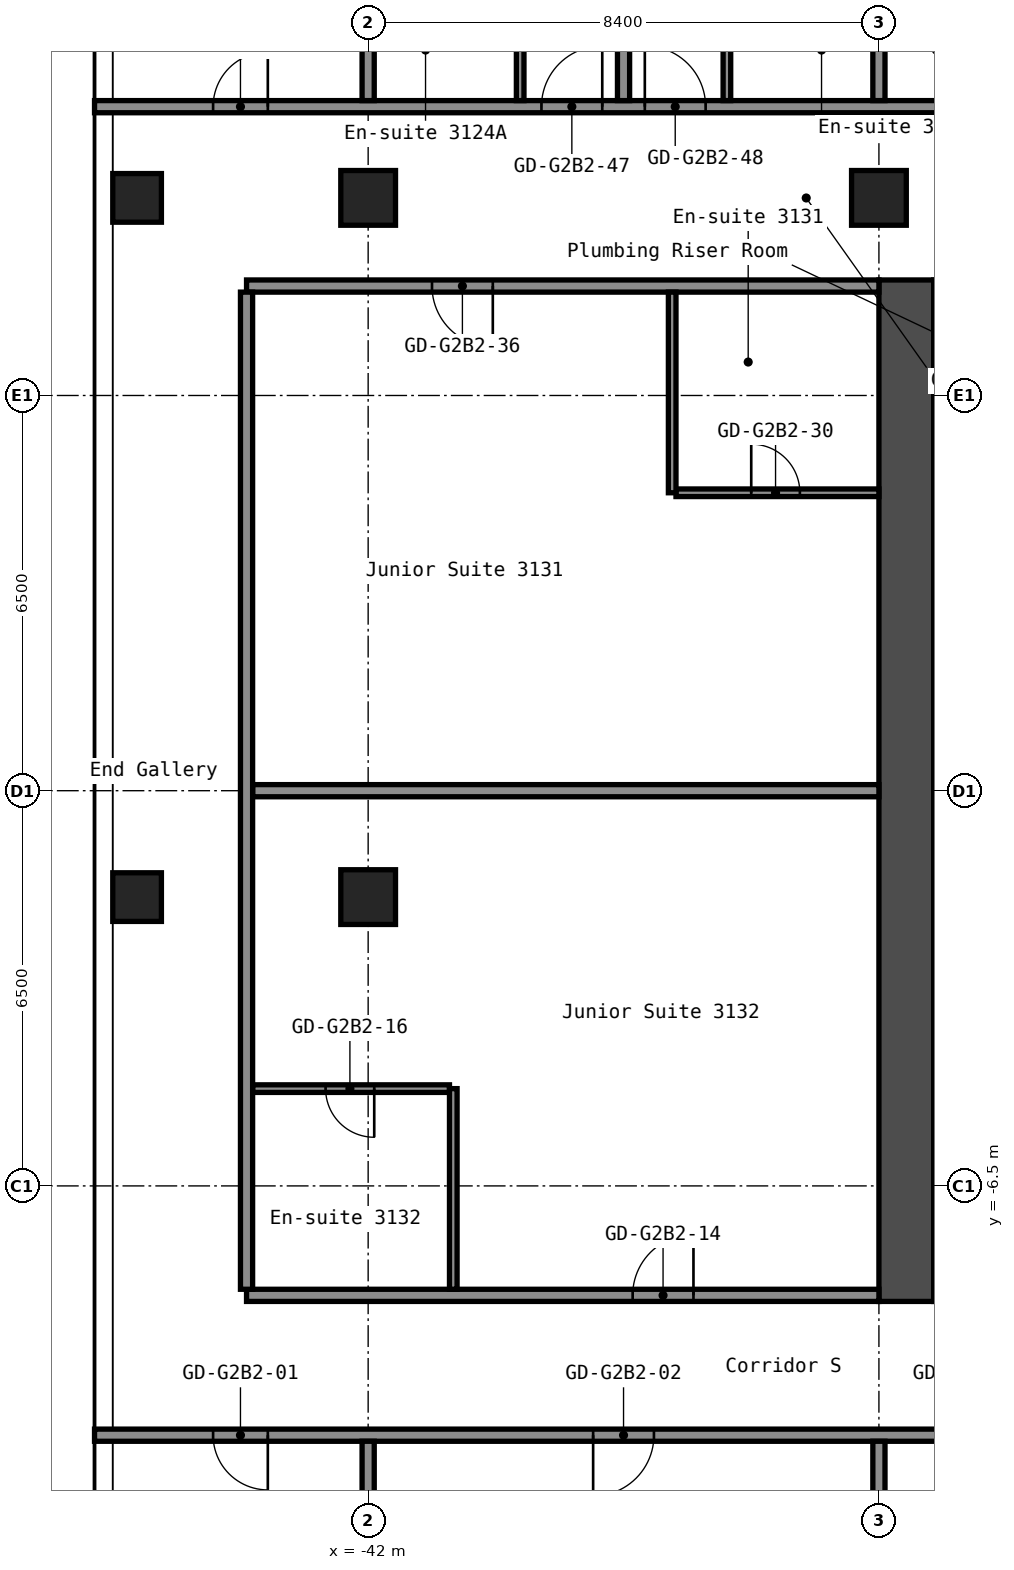
"""IFC4 building model, lengths in metres.
Left out: names, types, materials, properties, quantities, classifications, styles, units other than length and angle.
Written with IfcOpenShell. Run it as: python <this file> out.ifc"""

import sys

from ifc_helpers import new_model, si_unit, direction, frame, frame_2d, origin, origin_2d, place, context, subcontext, project, spatial, rectangle, hollow_rectangle, extrude, element, fill, save


model = new_model("IFC4")
c1 = context("Model", 3, precision=1e-05, world=origin(), true_north=direction((0.0, 1.0)))
c2 = subcontext(c1, "Body", "Model", "MODEL_VIEW")
j1 = project(units=[si_unit("LENGTHUNIT", "METRE"), si_unit("PLANEANGLEUNIT", "RADIAN")], contexts=[c1])
p1 = place(None, origin())
s1 = spatial("IfcSite", under=j1, at=p1, CompositionType="ELEMENT")
p2 = place(p1, origin())
s2 = spatial("IfcBuilding", under=s1, at=p2, CompositionType="ELEMENT")
p3 = place(p2, frame((0.0, 0.0, 110.6)))
s3 = spatial("IfcBuildingStorey", under=s2, at=p3, CompositionType="ELEMENT", Elevation=110.6)
for number, where, z_axis, x_axis in (
    (1, (-45.8, -1.75, 0.0), (0.0, 0.0, 1.0), (1.0, 0.0, 0.0)),
    (2, (-45.8, 9.75, 0.0), (0.0, 0.0, 1.0), (1.0, 0.0, 0.0)),
):
    element("IfcColumn", number, at=place(p3, frame(where, z_axis=z_axis, x_axis=x_axis)), inside=s3, PredefinedType="COLUMN", context=c2, shape_type="SweptSolid", body=[
        extrude(hollow_rectangle(XDim=0.8, YDim=0.8, WallThickness=0.032, at=origin_2d()), origin(), (0.0, 0.0, 1.0), 2.8),
    ])
for number, where, z_axis, x_axis in (
    (3, (-42.0, -1.75, 0.0), (0.0, 0.0, 1.0), (1.0, 0.0, 0.0)),
    (4, (-42.0, 9.75, 0.0), (0.0, 0.0, 1.0), (1.0, 0.0, 0.0)),
    (5, (-33.6, 9.75, 0.0), (0.0, 0.0, 1.0), (1.0, 0.0, 0.0)),
):
    element("IfcColumn", number, at=place(p3, frame(where, z_axis=z_axis, x_axis=x_axis)), inside=s3, PredefinedType="COLUMN", context=c2, shape_type="SweptSolid", body=[
        extrude(hollow_rectangle(XDim=0.9, YDim=0.9, WallThickness=0.036, at=origin_2d()), origin(), (0.0, 0.0, 1.0), 2.8),
    ])
p4 = place(p3, frame((-33.15, -8.4, 0.0), z_axis=(0.0, 0.0, 1.0), x_axis=(0.0, 1.0, 0.0)))
e6 = element("IfcWall", 6, at=p4, inside=s3, PredefinedType="SHEAR", context=c2, shape_type="SweptSolid", body=[
    extrude(rectangle(XDim=16.8, YDim=0.9, at=frame_2d((8.4, 0.0))), origin(), (0.0, 0.0, 1.0), 2.8),
])
p5 = place(p3, frame((-32.7, 1.325, 0.0), z_axis=(0.0, 0.0, 1.0), x_axis=(1.0, 0.0, 0.0)))
e7 = element("IfcWall", 7, at=p5, inside=s3, PredefinedType="SHEAR", context=c2, shape_type="SweptSolid", body=[
    extrude(rectangle(XDim=5.05, YDim=0.25, at=frame_2d((2.525, 0.0))), origin(), (0.0, 0.0, 1.0), 2.8),
])
p6 = place(p5, frame((3.3, 0.0, 0.0)))
e8 = element("IfcOpeningElement", 8, at=p6, cuts=e7, PredefinedType="OPENING", context=c2, shape_type="SweptSolid", body=[
    extrude(rectangle(XDim=1.2, YDim=2.1, at=frame_2d((0.6, 1.05))), frame((0.0, 0.135, 0.0), z_axis=(0.0, -1.0, 0.0), x_axis=(1.0, 0.0, 0.0)), (0.0, 0.0, 1.0), 0.27),
])
p7 = place(p3, frame((-32.7, -3.625, 0.0), z_axis=(0.0, 0.0, 1.0), x_axis=(1.0, 0.0, 0.0)))
e9 = element("IfcWall", 9, at=p7, inside=s3, PredefinedType="SHEAR", context=c2, shape_type="SweptSolid", body=[
    extrude(rectangle(XDim=4.55, YDim=0.25, at=frame_2d((2.275, 0.0))), origin(), (0.0, 0.0, 1.0), 2.8),
])
p8 = place(p7, frame((2.85, 0.0, 0.0)))
e10 = element("IfcOpeningElement", 10, at=p8, cuts=e9, PredefinedType="OPENING", context=c2, shape_type="SweptSolid", body=[
    extrude(rectangle(XDim=1.1, YDim=2.1, at=frame_2d((0.55, 1.05))), frame((0.0, 0.135, 0.0), z_axis=(0.0, -1.0, 0.0), x_axis=(1.0, 0.0, 0.0)), (0.0, 0.0, 1.0), 0.27),
])
p9 = place(p7, frame((0.6, 0.0, 0.0)))
e11 = element("IfcOpeningElement", 11, at=p9, cuts=e9, PredefinedType="OPENING", context=c2, shape_type="SweptSolid", body=[
    extrude(rectangle(XDim=1.1, YDim=2.1, at=frame_2d((0.55, 1.05))), frame((0.0, 0.135, 0.0), z_axis=(0.0, -1.0, 0.0), x_axis=(1.0, 0.0, 0.0)), (0.0, 0.0, 1.0), 0.27),
])
p10 = place(p3, frame((-32.7, -6.75, 0.0), z_axis=(0.0, 0.0, 1.0), x_axis=(1.0, 0.0, 0.0)))
e12 = element("IfcWall", 12, at=p10, inside=s3, PredefinedType="SHEAR", context=c2, shape_type="SweptSolid", body=[
    extrude(rectangle(XDim=4.55, YDim=1.5, at=frame_2d((2.275, 0.0))), origin(), (0.0, 0.0, 1.0), 2.8),
])
p11 = place(p3, frame((-32.7, -0.875, 0.0), z_axis=(0.0, 0.0, 1.0), x_axis=(1.0, 0.0, 0.0)))
e13 = element("IfcWall", 13, at=p11, inside=s3, PredefinedType="PARTITIONING", context=c2, shape_type="SweptSolid", body=[
    extrude(rectangle(XDim=2.3, YDim=0.15, at=frame_2d((1.15, 0.0))), origin(), (0.0, 0.0, 1.0), 2.8),
])
p12 = place(p3, frame((-46.5, -10.6, 0.0), z_axis=(0.0, 0.0, 1.0), x_axis=(1.0, 0.0, 0.0)))
e14 = element("IfcWall", 14, at=p12, inside=s3, PredefinedType="PARTITIONING", context=c2, shape_type="SweptSolid", body=[
    extrude(rectangle(XDim=29.7, YDim=0.2, at=frame_2d((14.85, 0.0))), origin(), (0.0, 0.0, 1.0), 2.8),
])
p13 = place(p12, frame((1.95, 0.0, 0.0)))
e15 = element("IfcOpeningElement", 15, at=p13, cuts=e14, PredefinedType="OPENING", context=c2, shape_type="SweptSolid", body=[
    extrude(rectangle(XDim=0.9, YDim=2.1, at=frame_2d((0.45, 1.05))), frame((0.0, 0.11, 0.0), z_axis=(0.0, -1.0, 0.0), x_axis=(1.0, 0.0, 0.0)), (0.0, 0.0, 1.0), 0.22),
])
p14 = place(p12, frame((8.2, 0.0, 0.0)))
e16 = element("IfcOpeningElement", 16, at=p14, cuts=e14, PredefinedType="OPENING", context=c2, shape_type="SweptSolid", body=[
    extrude(rectangle(XDim=1.0, YDim=2.1, at=frame_2d((0.5, 1.05))), frame((0.0, 0.11, 0.0), z_axis=(0.0, -1.0, 0.0), x_axis=(1.0, 0.0, 0.0)), (0.0, 0.0, 1.0), 0.22),
])
p15 = place(p12, frame((13.96, 0.0, 0.0)))
e17 = element("IfcOpeningElement", 17, at=p15, cuts=e14, PredefinedType="OPENING", context=c2, shape_type="SweptSolid", body=[
    extrude(rectangle(XDim=0.9, YDim=2.1, at=frame_2d((0.45, 1.05))), frame((0.0, 0.11, 0.0), z_axis=(0.0, -1.0, 0.0), x_axis=(1.0, 0.0, 0.0)), (0.0, 0.0, 1.0), 0.22),
])
p16 = place(p12, frame((18.16, 0.0, 0.0)))
e18 = element("IfcOpeningElement", 18, at=p16, cuts=e14, PredefinedType="OPENING", context=c2, shape_type="SweptSolid", body=[
    extrude(rectangle(XDim=0.9, YDim=2.1, at=frame_2d((0.45, 1.05))), frame((0.0, 0.11, 0.0), z_axis=(0.0, -1.0, 0.0), x_axis=(1.0, 0.0, 0.0)), (0.0, 0.0, 1.0), 0.22),
])
p17 = place(p12, frame((23.2, 0.0, 0.0)))
e19 = element("IfcOpeningElement", 19, at=p17, cuts=e14, PredefinedType="OPENING", context=c2, shape_type="SweptSolid", body=[
    extrude(rectangle(XDim=0.9, YDim=2.1, at=frame_2d((0.45, 1.05))), frame((0.0, 0.11, 0.0), z_axis=(0.0, -1.0, 0.0), x_axis=(1.0, 0.0, 0.0)), (0.0, 0.0, 1.0), 0.22),
])
p18 = place(p12, frame((27.4, 0.0, 0.0)))
e20 = element("IfcOpeningElement", 20, at=p18, cuts=e14, PredefinedType="OPENING", context=c2, shape_type="SweptSolid", body=[
    extrude(rectangle(XDim=0.9, YDim=2.1, at=frame_2d((0.45, 1.05))), frame((0.0, 0.11, 0.0), z_axis=(0.0, -1.0, 0.0), x_axis=(1.0, 0.0, 0.0)), (0.0, 0.0, 1.0), 0.22),
])
p19 = place(p3, frame((-44.0, -8.3, 0.0), z_axis=(0.0, 0.0, 1.0), x_axis=(1.0, 0.0, 0.0)))
e21 = element("IfcWall", 21, at=p19, inside=s3, PredefinedType="PARTITIONING", context=c2, shape_type="SweptSolid", body=[
    extrude(rectangle(XDim=10.4, YDim=0.2, at=frame_2d((5.2, 0.0))), origin(), (0.0, 0.0, 1.0), 2.8),
])
p20 = place(p19, frame((6.35, 0.0, 0.0)))
e22 = element("IfcOpeningElement", 22, at=p20, cuts=e21, PredefinedType="OPENING", context=c2, shape_type="SweptSolid", body=[
    extrude(rectangle(XDim=1.0, YDim=2.1, at=frame_2d((0.5, 1.05))), frame((0.0, 0.11, 0.0), z_axis=(0.0, -1.0, 0.0), x_axis=(1.0, 0.0, 0.0)), (0.0, 0.0, 1.0), 0.22),
])
p21 = place(p3, frame((-43.9, -4.9, 0.0), z_axis=(0.0, 0.0, 1.0), x_axis=(1.0, 0.0, 0.0)))
e23 = element("IfcWall", 23, at=p21, inside=s3, PredefinedType="PARTITIONING", context=c2, shape_type="SweptSolid", body=[
    extrude(rectangle(XDim=3.237, YDim=0.125, at=frame_2d((1.619, 0.0))), origin(), (0.0, 0.0, 1.0), 2.8),
])
p22 = place(p21, frame((1.2, 0.0, 0.0)))
e24 = element("IfcOpeningElement", 24, at=p22, cuts=e23, PredefinedType="OPENING", context=c2, shape_type="SweptSolid", body=[
    extrude(rectangle(XDim=0.8, YDim=2.1, at=frame_2d((0.4, 1.05))), frame((0.0, 0.073, 0.0), z_axis=(0.0, -1.0, 0.0), x_axis=(1.0, 0.0, 0.0)), (0.0, 0.0, 1.0), 0.145),
])
p23 = place(p3, frame((-43.9, 0.0, 0.0), z_axis=(0.0, 0.0, 1.0), x_axis=(1.0, 0.0, 0.0)))
e25 = element("IfcWall", 25, at=p23, inside=s3, PredefinedType="PARTITIONING", context=c2, shape_type="SweptSolid", body=[
    extrude(rectangle(XDim=10.3, YDim=0.2, at=frame_2d((5.15, 0.0))), origin(), (0.0, 0.0, 1.0), 2.8),
])
p24 = place(p3, frame((-36.938, 4.9, 0.0), z_axis=(0.0, 0.0, 1.0), x_axis=(1.0, 0.0, 0.0)))
e26 = element("IfcWall", 26, at=p24, inside=s3, PredefinedType="PARTITIONING", context=c2, shape_type="SweptSolid", body=[
    extrude(rectangle(XDim=3.337, YDim=0.125, at=frame_2d((1.669, 0.0))), origin(), (0.0, 0.0, 1.0), 2.8),
])
p25 = place(p24, frame((1.238, 0.0, 0.0)))
e27 = element("IfcOpeningElement", 27, at=p25, cuts=e26, PredefinedType="OPENING", context=c2, shape_type="SweptSolid", body=[
    extrude(rectangle(XDim=0.8, YDim=2.1, at=frame_2d((0.4, 1.05))), frame((0.0, 0.073, 0.0), z_axis=(0.0, -1.0, 0.0), x_axis=(1.0, 0.0, 0.0)), (0.0, 0.0, 1.0), 0.145),
])
p26 = place(p3, frame((-44.0, 8.3, 0.0), z_axis=(0.0, 0.0, 1.0), x_axis=(1.0, 0.0, 0.0)))
e28 = element("IfcWall", 28, at=p26, inside=s3, PredefinedType="PARTITIONING", context=c2, shape_type="SweptSolid", body=[
    extrude(rectangle(XDim=10.4, YDim=0.2, at=frame_2d((5.2, 0.0))), origin(), (0.0, 0.0, 1.0), 2.8),
])
p27 = place(p26, frame((3.05, 0.0, 0.0)))
e29 = element("IfcOpeningElement", 29, at=p27, cuts=e28, PredefinedType="OPENING", context=c2, shape_type="SweptSolid", body=[
    extrude(rectangle(XDim=1.0, YDim=2.1, at=frame_2d((0.5, 1.05))), frame((0.0, 0.11, 0.0), z_axis=(0.0, -1.0, 0.0), x_axis=(1.0, 0.0, 0.0)), (0.0, 0.0, 1.0), 0.22),
])
p28 = place(p3, frame((-46.5, 11.25, 0.0), z_axis=(0.0, 0.0, 1.0), x_axis=(1.0, 0.0, 0.0)))
e30 = element("IfcWall", 30, at=p28, inside=s3, PredefinedType="PARTITIONING", context=c2, shape_type="SweptSolid", body=[
    extrude(rectangle(XDim=29.7, YDim=0.2, at=frame_2d((14.85, 0.0))), origin(), (0.0, 0.0, 1.0), 2.8),
])
p29 = place(p28, frame((1.95, 0.0, 0.0)))
e31 = element("IfcOpeningElement", 31, at=p29, cuts=e30, PredefinedType="OPENING", context=c2, shape_type="SweptSolid", body=[
    extrude(rectangle(XDim=0.9, YDim=2.1, at=frame_2d((0.45, 1.05))), frame((0.0, 0.11, 0.0), z_axis=(0.0, -1.0, 0.0), x_axis=(1.0, 0.0, 0.0)), (0.0, 0.0, 1.0), 0.22),
])
p30 = place(p28, frame((7.35, 0.0, 0.0)))
e32 = element("IfcOpeningElement", 32, at=p30, cuts=e30, PredefinedType="OPENING", context=c2, shape_type="SweptSolid", body=[
    extrude(rectangle(XDim=1.0, YDim=2.1, at=frame_2d((0.5, 1.05))), frame((0.0, 0.11, 0.0), z_axis=(0.0, -1.0, 0.0), x_axis=(1.0, 0.0, 0.0)), (0.0, 0.0, 1.0), 0.22),
])
p31 = place(p28, frame((9.05, 0.0, 0.0)))
e33 = element("IfcOpeningElement", 33, at=p31, cuts=e30, PredefinedType="OPENING", context=c2, shape_type="SweptSolid", body=[
    extrude(rectangle(XDim=1.0, YDim=2.1, at=frame_2d((0.5, 1.05))), frame((0.0, 0.11, 0.0), z_axis=(0.0, -1.0, 0.0), x_axis=(1.0, 0.0, 0.0)), (0.0, 0.0, 1.0), 0.22),
])
p32 = place(p28, frame((15.75, 0.0, 0.0)))
e34 = element("IfcOpeningElement", 34, at=p32, cuts=e30, PredefinedType="OPENING", context=c2, shape_type="SweptSolid", body=[
    extrude(rectangle(XDim=1.0, YDim=2.1, at=frame_2d((0.5, 1.05))), frame((0.0, 0.11, 0.0), z_axis=(0.0, -1.0, 0.0), x_axis=(1.0, 0.0, 0.0)), (0.0, 0.0, 1.0), 0.22),
])
p33 = place(p28, frame((17.45, 0.0, 0.0)))
e35 = element("IfcOpeningElement", 35, at=p33, cuts=e30, PredefinedType="OPENING", context=c2, shape_type="SweptSolid", body=[
    extrude(rectangle(XDim=1.0, YDim=2.1, at=frame_2d((0.5, 1.05))), frame((0.0, 0.11, 0.0), z_axis=(0.0, -1.0, 0.0), x_axis=(1.0, 0.0, 0.0)), (0.0, 0.0, 1.0), 0.22),
])
p34 = place(p28, frame((24.15, 0.0, 0.0)))
e36 = element("IfcOpeningElement", 36, at=p34, cuts=e30, PredefinedType="OPENING", context=c2, shape_type="SweptSolid", body=[
    extrude(rectangle(XDim=1.0, YDim=2.1, at=frame_2d((0.5, 1.05))), frame((0.0, 0.11, 0.0), z_axis=(0.0, -1.0, 0.0), x_axis=(1.0, 0.0, 0.0)), (0.0, 0.0, 1.0), 0.22),
])
p35 = place(p28, frame((25.85, 0.0, 0.0)))
e37 = element("IfcOpeningElement", 37, at=p35, cuts=e30, PredefinedType="OPENING", context=c2, shape_type="SweptSolid", body=[
    extrude(rectangle(XDim=1.0, YDim=2.1, at=frame_2d((0.5, 1.05))), frame((0.0, 0.11, 0.0), z_axis=(0.0, -1.0, 0.0), x_axis=(1.0, 0.0, 0.0)), (0.0, 0.0, 1.0), 0.22),
])
p36 = place(p3, frame((-44.0, -8.2, 0.0), z_axis=(0.0, 0.0, 1.0), x_axis=(0.0, 1.0, 0.0)))
e38 = element("IfcWall", 38, at=p36, inside=s3, PredefinedType="PARTITIONING", context=c2, shape_type="SweptSolid", body=[
    extrude(rectangle(XDim=16.4, YDim=0.2, at=frame_2d((8.2, 0.0))), origin(), (0.0, 0.0, 1.0), 2.8),
])
p37 = place(p3, frame((-42.0, -15.55, 0.0), z_axis=(0.0, 0.0, 1.0), x_axis=(0.0, 1.0, 0.0)))
e39 = element("IfcWall", 39, at=p37, inside=s3, PredefinedType="PARTITIONING", context=c2, shape_type="SweptSolid", body=[
    extrude(rectangle(XDim=4.85, YDim=0.2, at=frame_2d((2.425, 0.0))), origin(), (0.0, 0.0, 1.0), 2.8),
])
p38 = place(p3, frame((-42.0, 11.35, 0.0), z_axis=(0.0, 0.0, 1.0), x_axis=(0.0, 1.0, 0.0)))
e40 = element("IfcWall", 40, at=p38, inside=s3, PredefinedType="PARTITIONING", context=c2, shape_type="SweptSolid", body=[
    extrude(rectangle(XDim=12.2, YDim=0.2, at=frame_2d((6.1, 0.0))), origin(), (0.0, 0.0, 1.0), 2.8),
])
p39 = place(p3, frame((-40.6, -8.2, 0.0), z_axis=(0.0, 0.0, 1.0), x_axis=(0.0, 1.0, 0.0)))
e41 = element("IfcWall", 41, at=p39, inside=s3, PredefinedType="PARTITIONING", context=c2, shape_type="SweptSolid", body=[
    extrude(rectangle(XDim=3.3, YDim=0.125, at=frame_2d((1.65, 0.0))), origin(), (0.0, 0.0, 1.0), 2.8),
])
p40 = place(p3, frame((-39.5, 11.35, 0.0), z_axis=(0.0, 0.0, 1.0), x_axis=(0.0, 1.0, 0.0)))
e42 = element("IfcWall", 42, at=p40, inside=s3, PredefinedType="PARTITIONING", context=c2, shape_type="SweptSolid", body=[
    extrude(rectangle(XDim=2.9, YDim=0.125, at=frame_2d((1.45, 0.0))), origin(), (0.0, 0.0, 1.0), 2.8),
])
p41 = place(p40, frame((1.5, 0.0, 0.0)))
e43 = element("IfcOpeningElement", 43, at=p41, cuts=e42, PredefinedType="OPENING", context=c2, shape_type="SweptSolid", body=[
    extrude(rectangle(XDim=0.8, YDim=2.1, at=frame_2d((0.4, 1.05))), frame((0.0, 0.073, 0.0), z_axis=(0.0, -1.0, 0.0), x_axis=(1.0, 0.0, 0.0)), (0.0, 0.0, 1.0), 0.145),
])
p42 = place(p3, frame((-37.8, 11.35, 0.0), z_axis=(0.0, 0.0, 1.0), x_axis=(0.0, 1.0, 0.0)))
e44 = element("IfcWall", 44, at=p42, inside=s3, PredefinedType="PARTITIONING", context=c2, shape_type="SweptSolid", body=[
    extrude(rectangle(XDim=12.2, YDim=0.2, at=frame_2d((6.1, 0.0))), origin(), (0.0, 0.0, 1.0), 2.8),
])
p43 = place(p3, frame((-37.0, 4.9, 0.0), z_axis=(0.0, 0.0, 1.0), x_axis=(0.0, 1.0, 0.0)))
e45 = element("IfcWall", 45, at=p43, inside=s3, PredefinedType="PARTITIONING", context=c2, shape_type="SweptSolid", body=[
    extrude(rectangle(XDim=3.3, YDim=0.125, at=frame_2d((1.65, 0.0))), origin(), (0.0, 0.0, 1.0), 2.8),
])
p44 = place(p3, frame((-36.1, 11.35, 0.0), z_axis=(0.0, 0.0, 1.0), x_axis=(0.0, 1.0, 0.0)))
e46 = element("IfcWall", 46, at=p44, inside=s3, PredefinedType="PARTITIONING", context=c2, shape_type="SweptSolid", body=[
    extrude(rectangle(XDim=2.9, YDim=0.125, at=frame_2d((1.45, 0.0))), origin(), (0.0, 0.0, 1.0), 2.8),
])
p45 = place(p44, frame((1.5, 0.0, 0.0)))
e47 = element("IfcOpeningElement", 47, at=p45, cuts=e46, PredefinedType="OPENING", context=c2, shape_type="SweptSolid", body=[
    extrude(rectangle(XDim=0.8, YDim=2.1, at=frame_2d((0.4, 1.05))), frame((0.0, 0.073, 0.0), z_axis=(0.0, -1.0, 0.0), x_axis=(1.0, 0.0, 0.0)), (0.0, 0.0, 1.0), 0.145),
])
p46 = place(p3, frame((-33.6, -15.55, 0.0), z_axis=(0.0, 0.0, 1.0), x_axis=(0.0, 1.0, 0.0)))
e48 = element("IfcWall", 48, at=p46, inside=s3, PredefinedType="PARTITIONING", context=c2, shape_type="SweptSolid", body=[
    extrude(rectangle(XDim=4.85, YDim=0.2, at=frame_2d((2.425, 0.0))), origin(), (0.0, 0.0, 1.0), 2.8),
])
p47 = place(p3, frame((-33.6, 11.35, 0.0), z_axis=(0.0, 0.0, 1.0), x_axis=(0.0, 1.0, 0.0)))
e49 = element("IfcWall", 49, at=p47, inside=s3, PredefinedType="PARTITIONING", context=c2, shape_type="SweptSolid", body=[
    extrude(rectangle(XDim=12.2, YDim=0.2, at=frame_2d((6.1, 0.0))), origin(), (0.0, 0.0, 1.0), 2.8),
])
p48 = place(p13, origin())
e50 = element("IfcDoor", 50, at=p48, inside=s3, OperationType="SINGLE_SWING_RIGHT", PredefinedType="DOOR", context=c2, shape_type="SweptSolid", body=[
    extrude(rectangle(XDim=0.9, YDim=2.1, at=frame_2d((0.45, 1.05))), frame((0.0, 0.025, 0.0), z_axis=(0.0, -1.0, 0.0), x_axis=(1.0, 0.0, 0.0)), (0.0, 0.0, 1.0), 0.05),
])
fill(e15, e50)
p49 = place(p14, origin())
e51 = element("IfcDoor", 51, at=p49, inside=s3, OperationType="SINGLE_SWING_LEFT", PredefinedType="DOOR", context=c2, shape_type="SweptSolid", body=[
    extrude(rectangle(XDim=1.0, YDim=2.1, at=frame_2d((0.5, 1.05))), frame((0.0, 0.025, 0.0), z_axis=(0.0, -1.0, 0.0), x_axis=(1.0, 0.0, 0.0)), (0.0, 0.0, 1.0), 0.05),
])
fill(e16, e51)
p50 = place(p20, origin())
e52 = element("IfcDoor", 52, at=p50, inside=s3, OperationType="SINGLE_SWING_LEFT", PredefinedType="DOOR", context=c2, shape_type="SweptSolid", body=[
    extrude(rectangle(XDim=1.0, YDim=2.1, at=frame_2d((0.5, 1.05))), frame((0.0, 0.025, 0.0), z_axis=(0.0, -1.0, 0.0), x_axis=(1.0, 0.0, 0.0)), (0.0, 0.0, 1.0), 0.05),
])
fill(e22, e52)
p51 = place(p22, origin())
e53 = element("IfcDoor", 53, at=p51, inside=s3, OperationType="SINGLE_SWING_RIGHT", PredefinedType="DOOR", context=c2, shape_type="SweptSolid", body=[
    extrude(rectangle(XDim=0.8, YDim=2.1, at=frame_2d((0.4, 1.05))), frame((0.0, 0.025, 0.0), z_axis=(0.0, -1.0, 0.0), x_axis=(1.0, 0.0, 0.0)), (0.0, 0.0, 1.0), 0.05),
])
fill(e24, e53)
p52 = place(p25, origin())
e54 = element("IfcDoor", 54, at=p52, inside=s3, OperationType="SINGLE_SWING_RIGHT", PredefinedType="DOOR", context=c2, shape_type="SweptSolid", body=[
    extrude(rectangle(XDim=0.8, YDim=2.1, at=frame_2d((0.4, 1.05))), frame((0.0, 0.025, 0.0), z_axis=(0.0, -1.0, 0.0), x_axis=(1.0, 0.0, 0.0)), (0.0, 0.0, 1.0), 0.05),
])
fill(e27, e54)
p53 = place(p27, origin())
e55 = element("IfcDoor", 55, at=p53, inside=s3, OperationType="SINGLE_SWING_RIGHT", PredefinedType="DOOR", context=c2, shape_type="SweptSolid", body=[
    extrude(rectangle(XDim=1.0, YDim=2.1, at=frame_2d((0.5, 1.05))), frame((0.0, 0.025, 0.0), z_axis=(0.0, -1.0, 0.0), x_axis=(1.0, 0.0, 0.0)), (0.0, 0.0, 1.0), 0.05),
])
fill(e29, e55)
p54 = place(p29, origin())
e56 = element("IfcDoor", 56, at=p54, inside=s3, OperationType="SINGLE_SWING_LEFT", PredefinedType="DOOR", context=c2, shape_type="SweptSolid", body=[
    extrude(rectangle(XDim=0.9, YDim=2.1, at=frame_2d((0.45, 1.05))), frame((0.0, 0.025, 0.0), z_axis=(0.0, -1.0, 0.0), x_axis=(1.0, 0.0, 0.0)), (0.0, 0.0, 1.0), 0.05),
])
fill(e31, e56)
p55 = place(p30, origin())
e57 = element("IfcDoor", 57, at=p55, inside=s3, OperationType="SINGLE_SWING_LEFT", PredefinedType="DOOR", context=c2, shape_type="SweptSolid", body=[
    extrude(rectangle(XDim=1.0, YDim=2.1, at=frame_2d((0.5, 1.05))), frame((0.0, 0.025, 0.0), z_axis=(0.0, -1.0, 0.0), x_axis=(1.0, 0.0, 0.0)), (0.0, 0.0, 1.0), 0.05),
])
fill(e32, e57)
p56 = place(p31, origin())
e58 = element("IfcDoor", 58, at=p56, inside=s3, OperationType="SINGLE_SWING_RIGHT", PredefinedType="DOOR", context=c2, shape_type="SweptSolid", body=[
    extrude(rectangle(XDim=1.0, YDim=2.1, at=frame_2d((0.5, 1.05))), frame((0.0, 0.025, 0.0), z_axis=(0.0, -1.0, 0.0), x_axis=(1.0, 0.0, 0.0)), (0.0, 0.0, 1.0), 0.05),
])
fill(e33, e58)
save(model, sys.argv[1])
